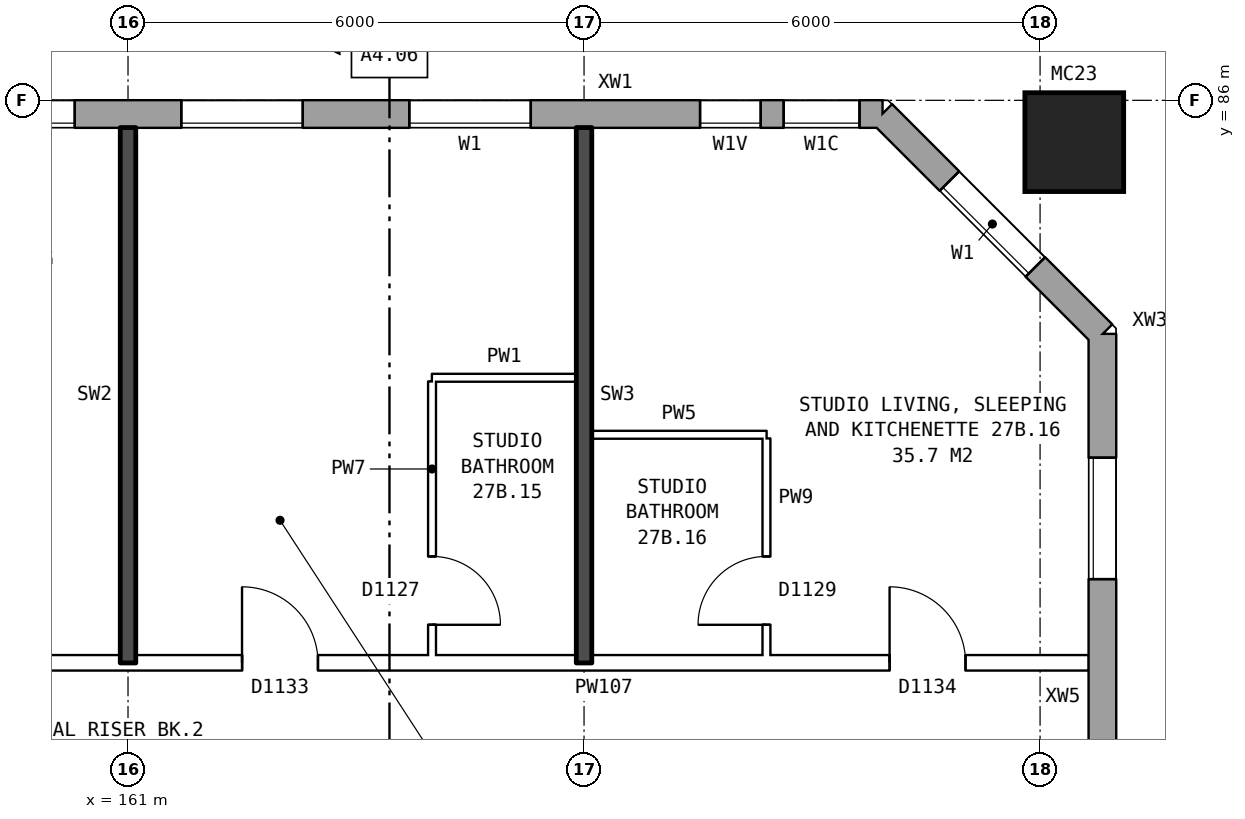
"""IFC4 building model, lengths in metres.
Left out: names, types, materials, properties, quantities, classifications, styles, units other than length and angle.
Written with IfcOpenShell. Run it as: python <this file> out.ifc"""

import sys

from ifc_helpers import new_model, si_unit, direction, frame, frame_2d, origin, origin_2d, place, context, subcontext, project, spatial, rectangle, hollow_rectangle, extrude, element, fill, save


model = new_model("IFC4")
c1 = context("Model", 3, precision=1e-05, world=origin(), true_north=direction((0.0, 1.0)))
c2 = subcontext(c1, "Body", "Model", "MODEL_VIEW")
j1 = project(units=[si_unit("LENGTHUNIT", "METRE"), si_unit("PLANEANGLEUNIT", "RADIAN")], contexts=[c1])
p1 = place(None, origin())
s1 = spatial("IfcSite", under=j1, at=p1, CompositionType="ELEMENT")
p2 = place(p1, origin())
s2 = spatial("IfcBuilding", under=s1, at=p2, CompositionType="ELEMENT")
p3 = place(p2, frame((0.0, 0.0, 99.5)))
s3 = spatial("IfcBuildingStorey", under=s2, at=p3, CompositionType="ELEMENT", Elevation=99.5)
p4 = place(p3, frame((173.45, 85.45, 0.0), z_axis=(0.0, 0.0, 1.0), x_axis=(1.0, 0.0, 0.0)))
e1 = element("IfcColumn", 1, at=p4, inside=s3, PredefinedType="COLUMN", context=c2, shape_type="SweptSolid", body=[
    extrude(hollow_rectangle(XDim=1.3, YDim=1.3, WallThickness=0.07, at=origin_2d()), origin(), (0.0, 0.0, 1.0), 3.1),
])
p5 = place(p3, frame((173.82, 57.075, 0.0), z_axis=(0.0, 0.0, 1.0), x_axis=(0.0, 1.0, 0.0)))
e2 = element("IfcWall", 2, at=p5, inside=s3, PredefinedType="STANDARD", context=c2, shape_type="SweptSolid", body=[
    extrude(rectangle(XDim=25.851, YDim=0.36, at=frame_2d((12.925, 0.0))), origin(), (0.0, 0.0, 1.0), 2.85),
])
p6 = place(p5, frame((1.625, 0.0, 0.8)))
e3 = element("IfcOpeningElement", 3, at=p6, cuts=e2, PredefinedType="OPENING", context=c2, shape_type="SweptSolid", body=[
    extrude(rectangle(XDim=1.6, YDim=1.8, at=frame_2d((0.8, 0.9))), frame((0.0, 0.19, 0.0), z_axis=(0.0, -1.0, 0.0), x_axis=(1.0, 0.0, 0.0)), (0.0, 0.0, 1.0), 0.38),
])
p7 = place(p5, frame((6.175, 0.0, 0.8)))
e4 = element("IfcOpeningElement", 4, at=p7, cuts=e2, PredefinedType="OPENING", context=c2, shape_type="SweptSolid", body=[
    extrude(rectangle(XDim=1.0, YDim=0.9, at=frame_2d((0.5, 0.45))), frame((0.0, 0.19, 0.0), z_axis=(0.0, -1.0, 0.0), x_axis=(1.0, 0.0, 0.0)), (0.0, 0.0, 1.0), 0.38),
])
p8 = place(p5, frame((7.625, 0.0, 0.8)))
e5 = element("IfcOpeningElement", 5, at=p8, cuts=e2, PredefinedType="OPENING", context=c2, shape_type="SweptSolid", body=[
    extrude(rectangle(XDim=1.6, YDim=1.8, at=frame_2d((0.8, 0.9))), frame((0.0, 0.19, 0.0), z_axis=(0.0, -1.0, 0.0), x_axis=(1.0, 0.0, 0.0)), (0.0, 0.0, 1.0), 0.38),
])
p9 = place(p5, frame((10.625, 0.0, 0.8)))
e6 = element("IfcOpeningElement", 6, at=p9, cuts=e2, PredefinedType="OPENING", context=c2, shape_type="SweptSolid", body=[
    extrude(rectangle(XDim=1.6, YDim=1.8, at=frame_2d((0.8, 0.9))), frame((0.0, 0.19, 0.0), z_axis=(0.0, -1.0, 0.0), x_axis=(1.0, 0.0, 0.0)), (0.0, 0.0, 1.0), 0.38),
])
p10 = place(p5, frame((13.625, 0.0, 0.8)))
e7 = element("IfcOpeningElement", 7, at=p10, cuts=e2, PredefinedType="OPENING", context=c2, shape_type="SweptSolid", body=[
    extrude(rectangle(XDim=1.6, YDim=1.8, at=frame_2d((0.8, 0.9))), frame((0.0, 0.19, 0.0), z_axis=(0.0, -1.0, 0.0), x_axis=(1.0, 0.0, 0.0)), (0.0, 0.0, 1.0), 0.38),
])
p11 = place(p5, frame((16.625, 0.0, 0.8)))
e8 = element("IfcOpeningElement", 8, at=p11, cuts=e2, PredefinedType="OPENING", context=c2, shape_type="SweptSolid", body=[
    extrude(rectangle(XDim=1.6, YDim=1.8, at=frame_2d((0.8, 0.9))), frame((0.0, 0.19, 0.0), z_axis=(0.0, -1.0, 0.0), x_axis=(1.0, 0.0, 0.0)), (0.0, 0.0, 1.0), 0.38),
])
p12 = place(p5, frame((9.525, 0.0, 0.8)))
e9 = element("IfcOpeningElement", 9, at=p12, cuts=e2, PredefinedType="OPENING", context=c2, shape_type="SweptSolid", body=[
    extrude(rectangle(XDim=0.8, YDim=1.8, at=frame_2d((0.4, 0.9))), frame((0.0, 0.19, 0.0), z_axis=(0.0, -1.0, 0.0), x_axis=(1.0, 0.0, 0.0)), (0.0, 0.0, 1.0), 0.38),
])
p13 = place(p5, frame((22.625, 0.0, 0.8)))
e10 = element("IfcOpeningElement", 10, at=p13, cuts=e2, PredefinedType="OPENING", context=c2, shape_type="SweptSolid", body=[
    extrude(rectangle(XDim=1.6, YDim=1.8, at=frame_2d((0.8, 0.9))), frame((0.0, 0.19, 0.0), z_axis=(0.0, -1.0, 0.0), x_axis=(1.0, 0.0, 0.0)), (0.0, 0.0, 1.0), 0.38),
])
p14 = place(p5, frame((12.525, 0.0, 0.8)))
e11 = element("IfcOpeningElement", 11, at=p14, cuts=e2, PredefinedType="OPENING", context=c2, shape_type="SweptSolid", body=[
    extrude(rectangle(XDim=0.8, YDim=1.8, at=frame_2d((0.4, 0.9))), frame((0.0, 0.19, 0.0), z_axis=(0.0, -1.0, 0.0), x_axis=(1.0, 0.0, 0.0)), (0.0, 0.0, 1.0), 0.38),
])
p15 = place(p5, frame((15.525, 0.0, 0.8)))
e12 = element("IfcOpeningElement", 12, at=p15, cuts=e2, PredefinedType="OPENING", context=c2, shape_type="SweptSolid", body=[
    extrude(rectangle(XDim=0.8, YDim=1.8, at=frame_2d((0.4, 0.9))), frame((0.0, 0.19, 0.0), z_axis=(0.0, -1.0, 0.0), x_axis=(1.0, 0.0, 0.0)), (0.0, 0.0, 1.0), 0.38),
])
p16 = place(p5, frame((18.525, 0.0, 0.8)))
e13 = element("IfcOpeningElement", 13, at=p16, cuts=e2, PredefinedType="OPENING", context=c2, shape_type="SweptSolid", body=[
    extrude(rectangle(XDim=1.0, YDim=0.9, at=frame_2d((0.5, 0.45))), frame((0.0, 0.19, 0.0), z_axis=(0.0, -1.0, 0.0), x_axis=(1.0, 0.0, 0.0)), (0.0, 0.0, 1.0), 0.38),
])
p17 = place(p3, frame((173.82, 82.925, 0.0), z_axis=(0.0, 0.0, 1.0), x_axis=(-0.707106781187, 0.707106781187, 0.0)))
e14 = element("IfcWall", 14, at=p17, inside=s3, PredefinedType="STANDARD", context=c2, shape_type="SweptSolid", body=[
    extrude(rectangle(XDim=4.094, YDim=0.36, at=frame_2d((2.047, 0.0))), origin(), (0.0, 0.0, 1.0), 2.85),
])
p18 = place(p17, frame((1.247, 0.0, 0.8)))
e15 = element("IfcOpeningElement", 15, at=p18, cuts=e14, PredefinedType="OPENING", context=c2, shape_type="SweptSolid", body=[
    extrude(rectangle(XDim=1.6, YDim=1.8, at=frame_2d((0.8, 0.9))), frame((0.0, 0.19, 0.0), z_axis=(0.0, -1.0, 0.0), x_axis=(1.0, 0.0, 0.0)), (0.0, 0.0, 1.0), 0.38),
])
p19 = place(p3, frame((170.925, 85.82, 0.0), z_axis=(0.0, 0.0, 1.0), x_axis=(-1.0, 0.0, 0.0)))
e16 = element("IfcWall", 16, at=p19, inside=s3, PredefinedType="STANDARD", context=c2, shape_type="SweptSolid", body=[
    extrude(rectangle(XDim=36.851, YDim=0.36, at=frame_2d((18.425, 0.0))), origin(), (0.0, 0.0, 1.0), 2.85),
])
p20 = place(p19, frame((0.3, 0.0, 0.8)))
e17 = element("IfcOpeningElement", 17, at=p20, cuts=e16, PredefinedType="OPENING", context=c2, shape_type="SweptSolid", body=[
    extrude(rectangle(XDim=1.0, YDim=1.8, at=frame_2d((0.5, 0.9))), frame((0.0, 0.19, 0.0), z_axis=(0.0, -1.0, 0.0), x_axis=(1.0, 0.0, 0.0)), (0.0, 0.0, 1.0), 0.38),
])
p21 = place(p19, frame((4.625, 0.0, 0.8)))
e18 = element("IfcOpeningElement", 18, at=p21, cuts=e16, PredefinedType="OPENING", context=c2, shape_type="SweptSolid", body=[
    extrude(rectangle(XDim=1.6, YDim=1.8, at=frame_2d((0.8, 0.9))), frame((0.0, 0.19, 0.0), z_axis=(0.0, -1.0, 0.0), x_axis=(1.0, 0.0, 0.0)), (0.0, 0.0, 1.0), 0.38),
])
p22 = place(p19, frame((7.625, 0.0, 0.8)))
e19 = element("IfcOpeningElement", 19, at=p22, cuts=e16, PredefinedType="OPENING", context=c2, shape_type="SweptSolid", body=[
    extrude(rectangle(XDim=1.6, YDim=1.8, at=frame_2d((0.8, 0.9))), frame((0.0, 0.19, 0.0), z_axis=(0.0, -1.0, 0.0), x_axis=(1.0, 0.0, 0.0)), (0.0, 0.0, 1.0), 0.38),
])
p23 = place(p19, frame((10.625, 0.0, 0.8)))
e20 = element("IfcOpeningElement", 20, at=p23, cuts=e16, PredefinedType="OPENING", context=c2, shape_type="SweptSolid", body=[
    extrude(rectangle(XDim=1.6, YDim=1.8, at=frame_2d((0.8, 0.9))), frame((0.0, 0.19, 0.0), z_axis=(0.0, -1.0, 0.0), x_axis=(1.0, 0.0, 0.0)), (0.0, 0.0, 1.0), 0.38),
])
p24 = place(p19, frame((13.625, 0.0, 0.8)))
e21 = element("IfcOpeningElement", 21, at=p24, cuts=e16, PredefinedType="OPENING", context=c2, shape_type="SweptSolid", body=[
    extrude(rectangle(XDim=1.6, YDim=1.8, at=frame_2d((0.8, 0.9))), frame((0.0, 0.19, 0.0), z_axis=(0.0, -1.0, 0.0), x_axis=(1.0, 0.0, 0.0)), (0.0, 0.0, 1.0), 0.38),
])
p25 = place(p19, frame((16.625, 0.0, 0.8)))
e22 = element("IfcOpeningElement", 22, at=p25, cuts=e16, PredefinedType="OPENING", context=c2, shape_type="SweptSolid", body=[
    extrude(rectangle(XDim=1.6, YDim=1.8, at=frame_2d((0.8, 0.9))), frame((0.0, 0.19, 0.0), z_axis=(0.0, -1.0, 0.0), x_axis=(1.0, 0.0, 0.0)), (0.0, 0.0, 1.0), 0.38),
])
p26 = place(p19, frame((19.625, 0.0, 0.8)))
e23 = element("IfcOpeningElement", 23, at=p26, cuts=e16, PredefinedType="OPENING", context=c2, shape_type="SweptSolid", body=[
    extrude(rectangle(XDim=1.6, YDim=1.8, at=frame_2d((0.8, 0.9))), frame((0.0, 0.19, 0.0), z_axis=(0.0, -1.0, 0.0), x_axis=(1.0, 0.0, 0.0)), (0.0, 0.0, 1.0), 0.38),
])
p27 = place(p19, frame((22.625, 0.0, 0.8)))
e24 = element("IfcOpeningElement", 24, at=p27, cuts=e16, PredefinedType="OPENING", context=c2, shape_type="SweptSolid", body=[
    extrude(rectangle(XDim=1.6, YDim=1.8, at=frame_2d((0.8, 0.9))), frame((0.0, 0.19, 0.0), z_axis=(0.0, -1.0, 0.0), x_axis=(1.0, 0.0, 0.0)), (0.0, 0.0, 1.0), 0.38),
])
p28 = place(p19, frame((25.625, 0.0, 0.8)))
e25 = element("IfcOpeningElement", 25, at=p28, cuts=e16, PredefinedType="OPENING", context=c2, shape_type="SweptSolid", body=[
    extrude(rectangle(XDim=1.6, YDim=1.8, at=frame_2d((0.8, 0.9))), frame((0.0, 0.19, 0.0), z_axis=(0.0, -1.0, 0.0), x_axis=(1.0, 0.0, 0.0)), (0.0, 0.0, 1.0), 0.38),
])
p29 = place(p19, frame((28.625, 0.0, 0.8)))
e26 = element("IfcOpeningElement", 26, at=p29, cuts=e16, PredefinedType="OPENING", context=c2, shape_type="SweptSolid", body=[
    extrude(rectangle(XDim=1.6, YDim=1.8, at=frame_2d((0.8, 0.9))), frame((0.0, 0.19, 0.0), z_axis=(0.0, -1.0, 0.0), x_axis=(1.0, 0.0, 0.0)), (0.0, 0.0, 1.0), 0.38),
])
p30 = place(p19, frame((30.525, 0.0, 0.8)))
e27 = element("IfcOpeningElement", 27, at=p30, cuts=e16, PredefinedType="OPENING", context=c2, shape_type="SweptSolid", body=[
    extrude(rectangle(XDim=1.6, YDim=1.8, at=frame_2d((0.8, 0.9))), frame((0.0, 0.19, 0.0), z_axis=(0.0, -1.0, 0.0), x_axis=(1.0, 0.0, 0.0)), (0.0, 0.0, 1.0), 0.38),
])
p31 = place(p19, frame((34.425, 0.0, 1.7)))
e28 = element("IfcOpeningElement", 28, at=p31, cuts=e16, PredefinedType="OPENING", context=c2, shape_type="SweptSolid", body=[
    extrude(rectangle(XDim=0.8, YDim=0.9, at=frame_2d((0.4, 0.45))), frame((0.0, 0.19, 0.0), z_axis=(0.0, -1.0, 0.0), x_axis=(1.0, 0.0, 0.0)), (0.0, 0.0, 1.0), 0.38),
])
p32 = place(p19, frame((1.6, 0.0, 1.7)))
e29 = element("IfcOpeningElement", 29, at=p32, cuts=e16, PredefinedType="OPENING", context=c2, shape_type="SweptSolid", body=[
    extrude(rectangle(XDim=0.8, YDim=0.9, at=frame_2d((0.4, 0.45))), frame((0.0, 0.19, 0.0), z_axis=(0.0, -1.0, 0.0), x_axis=(1.0, 0.0, 0.0)), (0.0, 0.0, 1.0), 0.38),
])
p33 = place(p19, frame((32.425, 0.0, 0.8)))
e30 = element("IfcOpeningElement", 30, at=p33, cuts=e16, PredefinedType="OPENING", context=c2, shape_type="SweptSolid", body=[
    extrude(rectangle(XDim=0.8, YDim=0.9, at=frame_2d((0.4, 0.45))), frame((0.0, 0.19, 0.0), z_axis=(0.0, -1.0, 0.0), x_axis=(1.0, 0.0, 0.0)), (0.0, 0.0, 1.0), 0.38),
])
p34 = place(p19, frame((35.525, 0.0, 0.8)))
e31 = element("IfcOpeningElement", 31, at=p34, cuts=e16, PredefinedType="OPENING", context=c2, shape_type="SweptSolid", body=[
    extrude(rectangle(XDim=1.0, YDim=1.8, at=frame_2d((0.5, 0.9))), frame((0.0, 0.19, 0.0), z_axis=(0.0, -1.0, 0.0), x_axis=(1.0, 0.0, 0.0)), (0.0, 0.0, 1.0), 0.38),
])
p35 = place(p3, frame((155.1, 78.6, 0.0), z_axis=(0.0, 0.0, 1.0), x_axis=(1.0, 0.0, 0.0)))
e32 = element("IfcWall", 32, at=p35, inside=s3, PredefinedType="PARTITIONING", context=c2, shape_type="SweptSolid", body=[
    extrude(rectangle(XDim=18.54, YDim=0.2, at=frame_2d((9.27, 0.0))), origin(), (0.0, 0.0, 1.0), 2.85),
])
p36 = place(p35, frame((3.6, 0.0, 0.0)))
e33 = element("IfcOpeningElement", 33, at=p36, cuts=e32, PredefinedType="OPENING", context=c2, shape_type="SweptSolid", body=[
    extrude(rectangle(XDim=1.0, YDim=2.1, at=frame_2d((0.5, 1.05))), frame((0.0, 0.11, 0.0), z_axis=(0.0, -1.0, 0.0), x_axis=(1.0, 0.0, 0.0)), (0.0, 0.0, 1.0), 0.22),
])
p37 = place(p35, frame((7.4, 0.0, 0.0)))
e34 = element("IfcOpeningElement", 34, at=p37, cuts=e32, PredefinedType="OPENING", context=c2, shape_type="SweptSolid", body=[
    extrude(rectangle(XDim=1.0, YDim=2.1, at=frame_2d((0.5, 1.05))), frame((0.0, 0.11, 0.0), z_axis=(0.0, -1.0, 0.0), x_axis=(1.0, 0.0, 0.0)), (0.0, 0.0, 1.0), 0.22),
])
p38 = place(p35, frame((15.92, 0.0, 0.0)))
e35 = element("IfcOpeningElement", 35, at=p38, cuts=e32, PredefinedType="OPENING", context=c2, shape_type="SweptSolid", body=[
    extrude(rectangle(XDim=1.0, YDim=2.1, at=frame_2d((0.5, 1.05))), frame((0.0, 0.11, 0.0), z_axis=(0.0, -1.0, 0.0), x_axis=(1.0, 0.0, 0.0)), (0.0, 0.0, 1.0), 0.22),
])
p39 = place(p3, frame((167.1, 81.6, 0.0), z_axis=(0.0, 0.0, 1.0), x_axis=(1.0, 0.0, 0.0)))
e36 = element("IfcWall", 36, at=p39, inside=s3, PredefinedType="PARTITIONING", context=c2, shape_type="SweptSolid", body=[
    extrude(rectangle(XDim=2.3, YDim=0.1, at=frame_2d((1.15, 0.0))), origin(), (0.0, 0.0, 1.0), 2.85),
])
p40 = place(p3, frame((165.0, 82.35, 0.0), z_axis=(0.0, 0.0, 1.0), x_axis=(1.0, 0.0, 0.0)))
e37 = element("IfcWall", 37, at=p40, inside=s3, PredefinedType="PARTITIONING", context=c2, shape_type="SweptSolid", body=[
    extrude(rectangle(XDim=1.9, YDim=0.1, at=frame_2d((0.95, 0.0))), origin(), (0.0, 0.0, 1.0), 2.85),
])
p41 = place(p3, frame((161.0, 78.6, 0.0), z_axis=(0.0, 0.0, 1.0), x_axis=(0.0, 1.0, 0.0)))
e38 = element("IfcWall", 38, at=p41, inside=s3, PredefinedType="SOLIDWALL", context=c2, shape_type="SweptSolid", body=[
    extrude(rectangle(XDim=7.04, YDim=0.2, at=frame_2d((3.52, 0.0))), origin(), (0.0, 0.0, 1.0), 2.85),
])
p42 = place(p3, frame((165.0, 78.7, 0.0), z_axis=(0.0, 0.0, 1.0), x_axis=(0.0, 1.0, 0.0)))
e39 = element("IfcWall", 39, at=p42, inside=s3, PredefinedType="PARTITIONING", context=c2, shape_type="SweptSolid", body=[
    extrude(rectangle(XDim=3.6, YDim=0.1, at=frame_2d((1.8, 0.0))), origin(), (0.0, 0.0, 1.0), 2.85),
])
p43 = place(p42, frame((0.4, 0.0, 0.0)))
e40 = element("IfcOpeningElement", 40, at=p43, cuts=e39, PredefinedType="OPENING", context=c2, shape_type="SweptSolid", body=[
    extrude(rectangle(XDim=0.9, YDim=2.1, at=frame_2d((0.45, 1.05))), frame((0.0, 0.06, 0.0), z_axis=(0.0, -1.0, 0.0), x_axis=(1.0, 0.0, 0.0)), (0.0, 0.0, 1.0), 0.12),
])
p44 = place(p3, frame((167.0, 78.6, 0.0), z_axis=(0.0, 0.0, 1.0), x_axis=(0.0, 1.0, 0.0)))
e41 = element("IfcWall", 41, at=p44, inside=s3, PredefinedType="SOLIDWALL", context=c2, shape_type="SweptSolid", body=[
    extrude(rectangle(XDim=7.04, YDim=0.2, at=frame_2d((3.52, 0.0))), origin(), (0.0, 0.0, 1.0), 2.85),
])
p45 = place(p3, frame((169.4, 78.7, 0.0), z_axis=(0.0, 0.0, 1.0), x_axis=(0.0, 1.0, 0.0)))
e42 = element("IfcWall", 42, at=p45, inside=s3, PredefinedType="PARTITIONING", context=c2, shape_type="SweptSolid", body=[
    extrude(rectangle(XDim=2.85, YDim=0.1, at=frame_2d((1.425, 0.0))), origin(), (0.0, 0.0, 1.0), 2.85),
])
p46 = place(p45, frame((0.4, 0.0, 0.0)))
e43 = element("IfcOpeningElement", 43, at=p46, cuts=e42, PredefinedType="OPENING", context=c2, shape_type="SweptSolid", body=[
    extrude(rectangle(XDim=0.9, YDim=2.1, at=frame_2d((0.45, 1.05))), frame((0.0, 0.06, 0.0), z_axis=(0.0, -1.0, 0.0), x_axis=(1.0, 0.0, 0.0)), (0.0, 0.0, 1.0), 0.12),
])
p47 = place(p13, origin())
e44 = element("IfcWindow", 44, at=p47, inside=s3, PartitioningType="SINGLE_PANEL", PredefinedType="WINDOW", context=c2, shape_type="SweptSolid", body=[
    extrude(rectangle(XDim=1.6, YDim=1.8, at=frame_2d((0.8, 0.9))), frame((0.0, 0.15, 0.0), z_axis=(0.0, -1.0, 0.0), x_axis=(1.0, 0.0, 0.0)), (0.0, 0.0, 1.0), 0.06),
])
fill(e10, e44)
p48 = place(p18, origin())
e45 = element("IfcWindow", 45, at=p48, inside=s3, PartitioningType="SINGLE_PANEL", PredefinedType="WINDOW", context=c2, shape_type="SweptSolid", body=[
    extrude(rectangle(XDim=1.6, YDim=1.8, at=frame_2d((0.8, 0.9))), frame((0.0, 0.15, 0.0), z_axis=(0.0, -1.0, 0.0), x_axis=(1.0, 0.0, 0.0)), (0.0, 0.0, 1.0), 0.06),
])
fill(e15, e45)
p49 = place(p20, origin())
e46 = element("IfcWindow", 46, at=p49, inside=s3, PartitioningType="SINGLE_PANEL", PredefinedType="WINDOW", context=c2, shape_type="SweptSolid", body=[
    extrude(rectangle(XDim=1.0, YDim=1.8, at=frame_2d((0.5, 0.9))), frame((0.0, 0.15, 0.0), z_axis=(0.0, -1.0, 0.0), x_axis=(1.0, 0.0, 0.0)), (0.0, 0.0, 1.0), 0.06),
])
fill(e17, e46)
p50 = place(p21, origin())
e47 = element("IfcWindow", 47, at=p50, inside=s3, PartitioningType="SINGLE_PANEL", PredefinedType="WINDOW", context=c2, shape_type="SweptSolid", body=[
    extrude(rectangle(XDim=1.6, YDim=1.8, at=frame_2d((0.8, 0.9))), frame((0.0, 0.15, 0.0), z_axis=(0.0, -1.0, 0.0), x_axis=(1.0, 0.0, 0.0)), (0.0, 0.0, 1.0), 0.06),
])
fill(e18, e47)
p51 = place(p22, origin())
e48 = element("IfcWindow", 48, at=p51, inside=s3, PartitioningType="SINGLE_PANEL", PredefinedType="WINDOW", context=c2, shape_type="SweptSolid", body=[
    extrude(rectangle(XDim=1.6, YDim=1.8, at=frame_2d((0.8, 0.9))), frame((0.0, 0.15, 0.0), z_axis=(0.0, -1.0, 0.0), x_axis=(1.0, 0.0, 0.0)), (0.0, 0.0, 1.0), 0.06),
])
fill(e19, e48)
p52 = place(p23, origin())
e49 = element("IfcWindow", 49, at=p52, inside=s3, PartitioningType="SINGLE_PANEL", PredefinedType="WINDOW", context=c2, shape_type="SweptSolid", body=[
    extrude(rectangle(XDim=1.6, YDim=1.8, at=frame_2d((0.8, 0.9))), frame((0.0, 0.15, 0.0), z_axis=(0.0, -1.0, 0.0), x_axis=(1.0, 0.0, 0.0)), (0.0, 0.0, 1.0), 0.06),
])
fill(e20, e49)
p53 = place(p37, origin())
e50 = element("IfcDoor", 50, at=p53, inside=s3, OperationType="SINGLE_SWING_LEFT", PredefinedType="DOOR", context=c2, shape_type="SweptSolid", body=[
    extrude(rectangle(XDim=1.0, YDim=2.1, at=frame_2d((0.5, 1.05))), frame((0.0, 0.025, 0.0), z_axis=(0.0, -1.0, 0.0), x_axis=(1.0, 0.0, 0.0)), (0.0, 0.0, 1.0), 0.05),
])
fill(e34, e50)
p54 = place(p43, frame((0.9, 0.0, 0.0), z_axis=(0.0, 0.0, 1.0), x_axis=(-1.0, 0.0, 0.0)))
e51 = element("IfcDoor", 51, at=p54, inside=s3, OperationType="SINGLE_SWING_RIGHT", PredefinedType="DOOR", context=c2, shape_type="SweptSolid", body=[
    extrude(rectangle(XDim=0.9, YDim=2.1, at=frame_2d((0.45, 1.05))), frame((0.0, 0.025, 0.0), z_axis=(0.0, -1.0, 0.0), x_axis=(1.0, 0.0, 0.0)), (0.0, 0.0, 1.0), 0.05),
])
fill(e40, e51)
p55 = place(p38, origin())
e52 = element("IfcDoor", 52, at=p55, inside=s3, OperationType="SINGLE_SWING_LEFT", PredefinedType="DOOR", context=c2, shape_type="SweptSolid", body=[
    extrude(rectangle(XDim=1.0, YDim=2.1, at=frame_2d((0.5, 1.05))), frame((0.0, 0.025, 0.0), z_axis=(0.0, -1.0, 0.0), x_axis=(1.0, 0.0, 0.0)), (0.0, 0.0, 1.0), 0.05),
])
fill(e35, e52)
p56 = place(p46, origin())
e53 = element("IfcDoor", 53, at=p56, inside=s3, OperationType="SINGLE_SWING_LEFT", PredefinedType="DOOR", context=c2, shape_type="SweptSolid", body=[
    extrude(rectangle(XDim=0.9, YDim=2.1, at=frame_2d((0.45, 1.05))), frame((0.0, 0.025, 0.0), z_axis=(0.0, -1.0, 0.0), x_axis=(1.0, 0.0, 0.0)), (0.0, 0.0, 1.0), 0.05),
])
fill(e43, e53)
p57 = place(p32, origin())
e54 = element("IfcWindow", 54, at=p57, inside=s3, PartitioningType="SINGLE_PANEL", PredefinedType="WINDOW", context=c2, shape_type="SweptSolid", body=[
    extrude(rectangle(XDim=0.8, YDim=0.9, at=frame_2d((0.4, 0.45))), frame((0.0, 0.15, 0.0), z_axis=(0.0, -1.0, 0.0), x_axis=(1.0, 0.0, 0.0)), (0.0, 0.0, 1.0), 0.06),
])
fill(e29, e54)
save(model, sys.argv[1])
